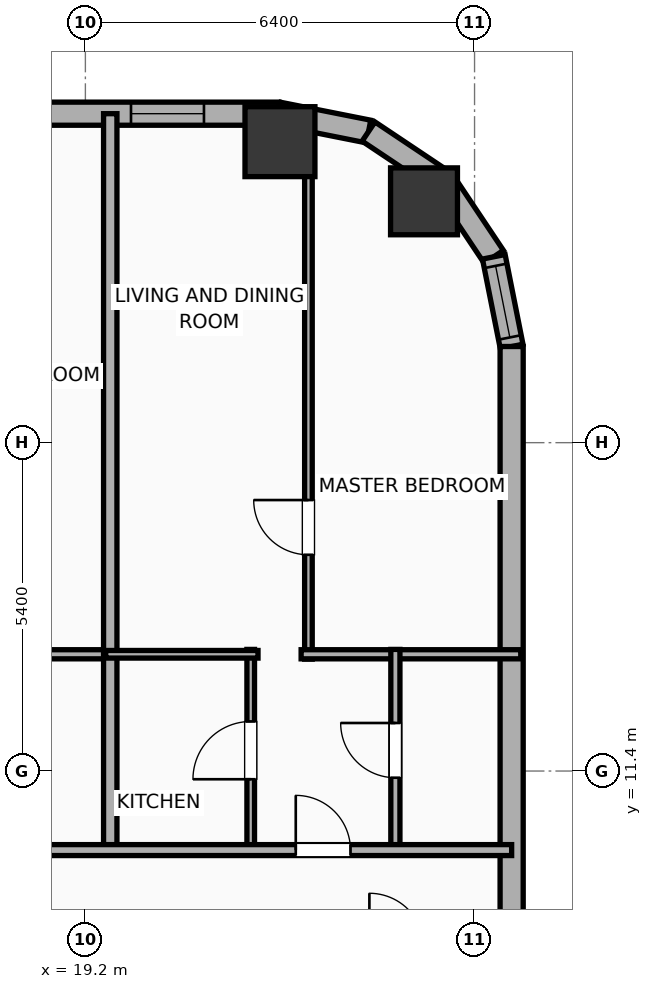
"""IFC4 building model, lengths in metres.
Left out: names, types, materials, properties, quantities, classifications, styles, units other than length and angle.
Written with IfcOpenShell. Run it as: python <this file> out.ifc"""

import sys

from ifc_helpers import new_model, si_unit, direction, frame, frame_2d, origin, origin_2d, place, context, subcontext, project, spatial, rectangle, hollow_rectangle, hollow_circle, extrude, element, fill, save


model = new_model("IFC4")
c1 = context("Model", 3, precision=1e-05, world=origin(), true_north=direction((0.0, 1.0)))
c2 = subcontext(c1, "Body", "Model", "MODEL_VIEW")
j1 = project(units=[si_unit("LENGTHUNIT", "METRE"), si_unit("PLANEANGLEUNIT", "RADIAN")], contexts=[c1])
p1 = place(None, origin())
s1 = spatial("IfcSite", under=j1, at=p1, CompositionType="ELEMENT")
p2 = place(p1, origin())
s2 = spatial("IfcBuilding", under=s1, at=p2, CompositionType="ELEMENT")
p3 = place(p2, frame((0.0, 0.0, 37.7)))
s3 = spatial("IfcBuildingStorey", under=s2, at=p3, CompositionType="ELEMENT", Elevation=37.7)
p4 = place(p3, frame((24.769, 20.769, 0.0), z_axis=(0.0, 0.0, 1.0), x_axis=(1.0, 0.0, 0.0)))
e1 = element("IfcColumn", 1, at=p4, inside=s3, PredefinedType="COLUMN", context=c2, shape_type="SweptSolid", body=[
    extrude(hollow_circle(Radius=0.55, WallThickness=0.036, at=origin_2d()), origin(), (0.0, 0.0, 1.0), 3.9),
])
p5 = place(p3, frame((22.4, 21.75, 0.0), z_axis=(0.0, 0.0, 1.0), x_axis=(1.0, 0.0, 0.0)))
e2 = element("IfcColumn", 2, at=p5, inside=s3, PredefinedType="COLUMN", context=c2, shape_type="SweptSolid", body=[
    extrude(hollow_rectangle(XDim=1.15, YDim=1.15, WallThickness=0.04, at=origin_2d()), origin(), (0.0, 0.0, 1.0), 3.9),
])
p6 = place(p3, frame((-29.581, 22.21, 0.0), z_axis=(0.0, 0.0, 1.0), x_axis=(1.0, 0.0, 0.0)))
e3 = element("IfcWall", 3, at=p6, inside=s3, PredefinedType="ELEMENTEDWALL", context=c2, shape_type="SweptSolid", body=[
    extrude(rectangle(XDim=51.963, YDim=0.38, at=frame_2d((25.981, 0.0))), origin(), (0.0, 0.0, 1.0), 3.65),
])
p7 = place(p6, frame((25.631, 0.0, 0.75)))
e4 = element("IfcOpeningElement", 4, at=p7, cuts=e3, PredefinedType="OPENING", context=c2, shape_type="SweptSolid", body=[
    extrude(rectangle(XDim=2.4, YDim=2.1, at=frame_2d((1.2, 1.05))), frame((0.0, 0.2, 0.0), z_axis=(0.0, -1.0, 0.0), x_axis=(1.0, 0.0, 0.0)), (0.0, 0.0, 1.0), 0.4),
])
p8 = place(p6, frame((42.952, 0.0, 0.75)))
e5 = element("IfcOpeningElement", 5, at=p8, cuts=e3, PredefinedType="OPENING", context=c2, shape_type="SweptSolid", body=[
    extrude(rectangle(XDim=2.4, YDim=2.1, at=frame_2d((1.2, 1.05))), frame((0.0, 0.2, 0.0), z_axis=(0.0, -1.0, 0.0), x_axis=(1.0, 0.0, 0.0)), (0.0, 0.0, 1.0), 0.4),
])
p9 = place(p6, frame((1.731, 0.0, 0.75)))
e6 = element("IfcOpeningElement", 6, at=p9, cuts=e3, PredefinedType="OPENING", context=c2, shape_type="SweptSolid", body=[
    extrude(rectangle(XDim=1.2, YDim=2.05, at=frame_2d((0.6, 1.025))), frame((0.0, 0.2, 0.0), z_axis=(0.0, -1.0, 0.0), x_axis=(1.0, 0.0, 0.0)), (0.0, 0.0, 1.0), 0.4),
])
p10 = place(p6, frame((5.272, 0.0, 0.75)))
e7 = element("IfcOpeningElement", 7, at=p10, cuts=e3, PredefinedType="OPENING", context=c2, shape_type="SweptSolid", body=[
    extrude(rectangle(XDim=1.2, YDim=2.05, at=frame_2d((0.6, 1.025))), frame((0.0, 0.2, 0.0), z_axis=(0.0, -1.0, 0.0), x_axis=(1.0, 0.0, 0.0)), (0.0, 0.0, 1.0), 0.4),
])
p11 = place(p6, frame((8.356, 0.0, 0.75)))
e8 = element("IfcOpeningElement", 8, at=p11, cuts=e3, PredefinedType="OPENING", context=c2, shape_type="SweptSolid", body=[
    extrude(rectangle(XDim=1.2, YDim=2.05, at=frame_2d((0.6, 1.025))), frame((0.0, 0.2, 0.0), z_axis=(0.0, -1.0, 0.0), x_axis=(1.0, 0.0, 0.0)), (0.0, 0.0, 1.0), 0.4),
])
p12 = place(p6, frame((15.632, 0.0, 0.75)))
e9 = element("IfcOpeningElement", 9, at=p12, cuts=e3, PredefinedType="OPENING", context=c2, shape_type="SweptSolid", body=[
    extrude(rectangle(XDim=1.2, YDim=2.05, at=frame_2d((0.6, 1.025))), frame((0.0, 0.2, 0.0), z_axis=(0.0, -1.0, 0.0), x_axis=(1.0, 0.0, 0.0)), (0.0, 0.0, 1.0), 0.4),
])
p13 = place(p6, frame((12.137, 0.0, 0.75)))
e10 = element("IfcOpeningElement", 10, at=p13, cuts=e3, PredefinedType="OPENING", context=c2, shape_type="SweptSolid", body=[
    extrude(rectangle(XDim=1.2, YDim=2.05, at=frame_2d((0.6, 1.025))), frame((0.0, 0.2, 0.0), z_axis=(0.0, -1.0, 0.0), x_axis=(1.0, 0.0, 0.0)), (0.0, 0.0, 1.0), 0.4),
])
p14 = place(p6, frame((18.756, 0.0, 0.75)))
e11 = element("IfcOpeningElement", 11, at=p14, cuts=e3, PredefinedType="OPENING", context=c2, shape_type="SweptSolid", body=[
    extrude(rectangle(XDim=1.2, YDim=2.05, at=frame_2d((0.6, 1.025))), frame((0.0, 0.2, 0.0), z_axis=(0.0, -1.0, 0.0), x_axis=(1.0, 0.0, 0.0)), (0.0, 0.0, 1.0), 0.4),
])
p15 = place(p6, frame((22.907, 0.0, 0.75)))
e12 = element("IfcOpeningElement", 12, at=p15, cuts=e3, PredefinedType="OPENING", context=c2, shape_type="SweptSolid", body=[
    extrude(rectangle(XDim=1.2, YDim=2.05, at=frame_2d((0.6, 1.025))), frame((0.0, 0.2, 0.0), z_axis=(0.0, -1.0, 0.0), x_axis=(1.0, 0.0, 0.0)), (0.0, 0.0, 1.0), 0.4),
])
p16 = place(p6, frame((36.381, 0.0, 0.75)))
e13 = element("IfcOpeningElement", 13, at=p16, cuts=e3, PredefinedType="OPENING", context=c2, shape_type="SweptSolid", body=[
    extrude(rectangle(XDim=1.2, YDim=2.05, at=frame_2d((0.6, 1.025))), frame((0.0, 0.2, 0.0), z_axis=(0.0, -1.0, 0.0), x_axis=(1.0, 0.0, 0.0)), (0.0, 0.0, 1.0), 0.4),
])
p17 = place(p6, frame((32.886, 0.0, 0.75)))
e14 = element("IfcOpeningElement", 14, at=p17, cuts=e3, PredefinedType="OPENING", context=c2, shape_type="SweptSolid", body=[
    extrude(rectangle(XDim=1.2, YDim=2.05, at=frame_2d((0.6, 1.025))), frame((0.0, 0.2, 0.0), z_axis=(0.0, -1.0, 0.0), x_axis=(1.0, 0.0, 0.0)), (0.0, 0.0, 1.0), 0.4),
])
p18 = place(p6, frame((39.556, 0.0, 0.75)))
e15 = element("IfcOpeningElement", 15, at=p18, cuts=e3, PredefinedType="OPENING", context=c2, shape_type="SweptSolid", body=[
    extrude(rectangle(XDim=1.2, YDim=2.05, at=frame_2d((0.6, 1.025))), frame((0.0, 0.2, 0.0), z_axis=(0.0, -1.0, 0.0), x_axis=(1.0, 0.0, 0.0)), (0.0, 0.0, 1.0), 0.4),
])
p19 = place(p6, frame((46.885, 0.0, 0.75)))
e16 = element("IfcOpeningElement", 16, at=p19, cuts=e3, PredefinedType="OPENING", context=c2, shape_type="SweptSolid", body=[
    extrude(rectangle(XDim=1.2, YDim=2.05, at=frame_2d((0.6, 1.025))), frame((0.0, 0.2, 0.0), z_axis=(0.0, -1.0, 0.0), x_axis=(1.0, 0.0, 0.0)), (0.0, 0.0, 1.0), 0.4),
])
p20 = place(p6, frame((49.531, 0.0, 0.75)))
e17 = element("IfcOpeningElement", 17, at=p20, cuts=e3, PredefinedType="OPENING", context=c2, shape_type="SweptSolid", body=[
    extrude(rectangle(XDim=1.2, YDim=2.05, at=frame_2d((0.6, 1.025))), frame((0.0, 0.2, 0.0), z_axis=(0.0, -1.0, 0.0), x_axis=(1.0, 0.0, 0.0)), (0.0, 0.0, 1.0), 0.4),
])
p21 = place(p3, frame((22.381, 22.21, 0.0), z_axis=(0.0, 0.0, 1.0), x_axis=(0.980786132421, -0.195086038585, 0.0)))
e18 = element("IfcWall", 18, at=p21, inside=s3, PredefinedType="ELEMENTEDWALL", context=c2, shape_type="SweptSolid", body=[
    extrude(rectangle(XDim=1.504, YDim=0.38, at=frame_2d((0.752, 0.0))), origin(), (0.0, 0.0, 1.0), 3.65),
])
for number, where, z_axis, x_axis in (
    (19, (23.857, 21.917, 0.0), (0.0, 0.0, 1.0), (0.831, -0.556, 0.0)),
    (20, (25.091, 21.091, 0.0), (0.0, 0.0, 1.0), (0.556, -0.831, 0.0)),
):
    element("IfcWall", number, at=place(p3, frame(where, z_axis=z_axis, x_axis=x_axis)), inside=s3, PredefinedType="ELEMENTEDWALL", context=c2, shape_type="SweptSolid", body=[
        extrude(rectangle(XDim=1.485, YDim=0.38, at=frame_2d((0.743, 0.0))), origin(), (0.0, 0.0, 1.0), 3.65),
    ])
p22 = place(p3, frame((25.917, 19.857, 0.0), z_axis=(0.0, 0.0, 1.0), x_axis=(0.195086038585, -0.980786132421, 0.0)))
e21 = element("IfcWall", 21, at=p22, inside=s3, PredefinedType="ELEMENTEDWALL", context=c2, shape_type="SweptSolid", body=[
    extrude(rectangle(XDim=1.504, YDim=0.38, at=frame_2d((0.752, 0.0))), origin(), (0.0, 0.0, 1.0), 3.65),
])
p23 = place(p22, frame((0.152, 0.0, 0.75)))
e22 = element("IfcOpeningElement", 22, at=p23, cuts=e21, PredefinedType="OPENING", context=c2, shape_type="SweptSolid", body=[
    extrude(rectangle(XDim=1.2, YDim=2.05, at=frame_2d((0.6, 1.025))), frame((0.0, 0.2, 0.0), z_axis=(0.0, -1.0, 0.0), x_axis=(1.0, 0.0, 0.0)), (0.0, 0.0, 1.0), 0.4),
])
p24 = place(p3, frame((26.21, 18.381, 0.0), z_axis=(0.0, 0.0, 1.0), x_axis=(0.0, -1.0, 0.0)))
e23 = element("IfcWall", 23, at=p24, inside=s3, PredefinedType="ELEMENTEDWALL", context=c2, shape_type="SweptSolid", body=[
    extrude(rectangle(XDim=36.763, YDim=0.38, at=frame_2d((18.381, 0.0))), origin(), (0.0, 0.0, 1.0), 3.65),
])
p25 = place(p3, frame((16.079, 13.32, 0.0), z_axis=(0.0, 0.0, 1.0), x_axis=(1.0, 0.0, 0.0)))
e24 = element("IfcWall", 24, at=p25, inside=s3, PredefinedType="PLUMBINGWALL", context=c2, shape_type="SweptSolid", body=[
    extrude(rectangle(XDim=3.605, YDim=0.15, at=frame_2d((1.802, 0.0))), origin(), (0.0, 0.0, 1.0), 3.65),
])
p26 = place(p3, frame((19.609, 10.02, 0.0), z_axis=(0.0, 0.0, 1.0), x_axis=(0.0, 1.0, 0.0)))
e25 = element("IfcWall", 25, at=p26, inside=s3, PredefinedType="PARTITIONING", context=c2, shape_type="SweptSolid", body=[
    extrude(rectangle(XDim=12.19, YDim=0.22, at=frame_2d((6.095, 0.0))), origin(), (0.0, 0.0, 1.0), 3.65),
])
p27 = place(p3, frame((22.868, 13.24, 0.0), z_axis=(0.0, 0.0, 1.0), x_axis=(0.0, 1.0, 0.0)))
e26 = element("IfcWall", 26, at=p27, inside=s3, PredefinedType="PARTITIONING", context=c2, shape_type="SweptSolid", body=[
    extrude(rectangle(XDim=9.026, YDim=0.125, at=frame_2d((4.513, 0.0))), origin(), (0.0, 0.0, 1.0), 2.94),
])
p28 = place(p27, frame((1.716, 0.0, 0.0)))
e27 = element("IfcOpeningElement", 27, at=p28, cuts=e26, PredefinedType="OPENING", context=c2, shape_type="SweptSolid", body=[
    extrude(rectangle(XDim=0.9, YDim=2.05, at=frame_2d((0.45, 1.025))), frame((0.0, 0.073, 0.0), z_axis=(0.0, -1.0, 0.0), x_axis=(1.0, 0.0, 0.0)), (0.0, 0.0, 1.0), 0.145),
])
p29 = place(p3, frame((22.748, 13.32, 0.0), z_axis=(0.0, 0.0, 1.0), x_axis=(1.0, 0.0, 0.0)))
e28 = element("IfcWall", 28, at=p29, inside=s3, PredefinedType="PLUMBINGWALL", context=c2, shape_type="SweptSolid", body=[
    extrude(rectangle(XDim=3.612, YDim=0.15, at=frame_2d((1.806, 0.0))), origin(), (0.0, 0.0, 1.0), 3.65),
])
p30 = place(p3, frame((21.919, 10.08, 0.0), z_axis=(0.0, 0.0, 1.0), x_axis=(0.0, 1.0, 0.0)))
e29 = element("IfcWall", 29, at=p30, inside=s3, PredefinedType="PARTITIONING", context=c2, shape_type="SweptSolid", body=[
    extrude(rectangle(XDim=3.32, YDim=0.125, at=frame_2d((1.66, 0.0))), origin(), (0.0, 0.0, 1.0), 3.65),
])
p31 = place(p30, frame((1.185, 0.0, 0.0)))
e30 = element("IfcOpeningElement", 30, at=p31, cuts=e29, PredefinedType="OPENING", context=c2, shape_type="SweptSolid", body=[
    extrude(rectangle(XDim=0.95, YDim=2.05, at=frame_2d((0.475, 1.025))), frame((0.0, 0.073, 0.0), z_axis=(0.0, -1.0, 0.0), x_axis=(1.0, 0.0, 0.0)), (0.0, 0.0, 1.0), 0.145),
])
p32 = place(p3, frame((19.534, 13.32, 0.0), z_axis=(0.0, 0.0, 1.0), x_axis=(1.0, 0.0, 0.0)))
e31 = element("IfcWall", 31, at=p32, inside=s3, PredefinedType="PARTITIONING", context=c2, shape_type="SweptSolid", body=[
    extrude(rectangle(XDim=2.505, YDim=0.125, at=frame_2d((1.252, 0.0))), origin(), (0.0, 0.0, 1.0), 3.65),
])
p33 = place(p3, frame((24.298, 10.08, 0.0), z_axis=(0.0, 0.0, 1.0), x_axis=(0.0, 1.0, 0.0)))
e32 = element("IfcWall", 32, at=p33, inside=s3, PredefinedType="PLUMBINGWALL", context=c2, shape_type="SweptSolid", body=[
    extrude(rectangle(XDim=3.32, YDim=0.15, at=frame_2d((1.66, 0.0))), origin(), (0.0, 0.0, 1.0), 3.65),
])
p34 = place(p33, frame((1.21, 0.0, 0.0)))
e33 = element("IfcOpeningElement", 33, at=p34, cuts=e32, PredefinedType="OPENING", context=c2, shape_type="SweptSolid", body=[
    extrude(rectangle(XDim=0.9, YDim=2.05, at=frame_2d((0.45, 1.025))), frame((0.0, 0.085, 0.0), z_axis=(0.0, -1.0, 0.0), x_axis=(1.0, 0.0, 0.0)), (0.0, 0.0, 1.0), 0.17),
])
p35 = place(p3, frame((-33.41, 10.1, 0.0), z_axis=(0.0, 0.0, 1.0), x_axis=(1.0, 0.0, 0.0)))
e34 = element("IfcWall", 34, at=p35, inside=s3, PredefinedType="PARTITIONING", context=c2, shape_type="SweptSolid", body=[
    extrude(rectangle(XDim=59.62, YDim=0.18, at=frame_2d((29.81, 0.0))), origin(), (0.0, 0.0, 1.0), 3.65),
])
p36 = place(p35, frame((3.354, 0.0, 0.0)))
e35 = element("IfcOpeningElement", 35, at=p36, cuts=e34, PredefinedType="OPENING", context=c2, shape_type="SweptSolid", body=[
    extrude(rectangle(XDim=1.15, YDim=2.05, at=frame_2d((0.575, 1.025))), frame((0.0, 0.1, 0.0), z_axis=(0.0, -1.0, 0.0), x_axis=(1.0, 0.0, 0.0)), (0.0, 0.0, 1.0), 0.2),
])
p37 = place(p35, frame((10.997, 0.0, 0.0)))
e36 = element("IfcOpeningElement", 36, at=p37, cuts=e34, PredefinedType="OPENING", context=c2, shape_type="SweptSolid", body=[
    extrude(rectangle(XDim=1.15, YDim=2.05, at=frame_2d((0.575, 1.025))), frame((0.0, 0.1, 0.0), z_axis=(0.0, -1.0, 0.0), x_axis=(1.0, 0.0, 0.0)), (0.0, 0.0, 1.0), 0.2),
])
p38 = place(p35, frame((20.232, 0.0, 0.0)))
e37 = element("IfcOpeningElement", 37, at=p38, cuts=e34, PredefinedType="OPENING", context=c2, shape_type="SweptSolid", body=[
    extrude(rectangle(XDim=1.15, YDim=2.05, at=frame_2d((0.575, 1.025))), frame((0.0, 0.1, 0.0), z_axis=(0.0, -1.0, 0.0), x_axis=(1.0, 0.0, 0.0)), (0.0, 0.0, 1.0), 0.2),
])
p39 = place(p35, frame((30.38, 0.0, 0.0)))
e38 = element("IfcOpeningElement", 38, at=p39, cuts=e34, PredefinedType="OPENING", context=c2, shape_type="SweptSolid", body=[
    extrude(rectangle(XDim=1.15, YDim=2.05, at=frame_2d((0.575, 1.025))), frame((0.0, 0.1, 0.0), z_axis=(0.0, -1.0, 0.0), x_axis=(1.0, 0.0, 0.0)), (0.0, 0.0, 1.0), 0.2),
])
p40 = place(p35, frame((40.998, 0.0, 0.0)))
e39 = element("IfcOpeningElement", 39, at=p40, cuts=e34, PredefinedType="OPENING", context=c2, shape_type="SweptSolid", body=[
    extrude(rectangle(XDim=1.15, YDim=2.05, at=frame_2d((0.575, 1.025))), frame((0.0, 0.1, 0.0), z_axis=(0.0, -1.0, 0.0), x_axis=(1.0, 0.0, 0.0)), (0.0, 0.0, 1.0), 0.2),
])
p41 = place(p35, frame((49.428, 0.0, 0.0)))
e40 = element("IfcOpeningElement", 40, at=p41, cuts=e34, PredefinedType="OPENING", context=c2, shape_type="SweptSolid", body=[
    extrude(rectangle(XDim=0.9, YDim=2.05, at=frame_2d((0.45, 1.025))), frame((0.0, 0.1, 0.0), z_axis=(0.0, -1.0, 0.0), x_axis=(1.0, 0.0, 0.0)), (0.0, 0.0, 1.0), 0.2),
])
p42 = place(p35, frame((56.07, 0.0, 0.0)))
e41 = element("IfcOpeningElement", 41, at=p42, cuts=e34, PredefinedType="OPENING", context=c2, shape_type="SweptSolid", body=[
    extrude(rectangle(XDim=0.9, YDim=2.05, at=frame_2d((0.45, 1.025))), frame((0.0, 0.1, 0.0), z_axis=(0.0, -1.0, 0.0), x_axis=(1.0, 0.0, 0.0)), (0.0, 0.0, 1.0), 0.2),
])
p43 = place(p20, origin())
e42 = element("IfcWindow", 42, at=p43, inside=s3, PartitioningType="SINGLE_PANEL", PredefinedType="WINDOW", context=c2, shape_type="SweptSolid", body=[
    extrude(rectangle(XDim=1.2, YDim=2.05, at=frame_2d((0.6, 1.025))), frame((0.0, 0.03, 0.0), z_axis=(0.0, -1.0, 0.0), x_axis=(1.0, 0.0, 0.0)), (0.0, 0.0, 1.0), 0.06),
])
fill(e17, e42)
p44 = place(p23, origin())
e43 = element("IfcWindow", 43, at=p44, inside=s3, PartitioningType="SINGLE_PANEL", PredefinedType="WINDOW", context=c2, shape_type="SweptSolid", body=[
    extrude(rectangle(XDim=1.2, YDim=2.05, at=frame_2d((0.6, 1.025))), frame((0.0, 0.03, 0.0), z_axis=(0.0, -1.0, 0.0), x_axis=(1.0, 0.0, 0.0)), (0.0, 0.0, 1.0), 0.06),
])
fill(e22, e43)
p45 = place(p28, origin())
e44 = element("IfcDoor", 44, at=p45, inside=s3, OperationType="SINGLE_SWING_RIGHT", PredefinedType="DOOR", context=c2, shape_type="SweptSolid", body=[
    extrude(rectangle(XDim=0.9, YDim=2.05, at=frame_2d((0.45, 1.025))), frame((0.0, 0.025, 0.0), z_axis=(0.0, -1.0, 0.0), x_axis=(1.0, 0.0, 0.0)), (0.0, 0.0, 1.0), 0.05),
])
fill(e27, e44)
p46 = place(p31, origin())
e45 = element("IfcDoor", 45, at=p46, inside=s3, OperationType="SINGLE_SWING_LEFT", PredefinedType="DOOR", context=c2, shape_type="SweptSolid", body=[
    extrude(rectangle(XDim=0.95, YDim=2.05, at=frame_2d((0.475, 1.025))), frame((0.0, 0.025, 0.0), z_axis=(0.0, -1.0, 0.0), x_axis=(1.0, 0.0, 0.0)), (0.0, 0.0, 1.0), 0.05),
])
fill(e30, e45)
p47 = place(p34, origin())
e46 = element("IfcDoor", 46, at=p47, inside=s3, OperationType="SINGLE_SWING_RIGHT", PredefinedType="DOOR", context=c2, shape_type="SweptSolid", body=[
    extrude(rectangle(XDim=0.9, YDim=2.05, at=frame_2d((0.45, 1.025))), frame((0.0, 0.025, 0.0), z_axis=(0.0, -1.0, 0.0), x_axis=(1.0, 0.0, 0.0)), (0.0, 0.0, 1.0), 0.05),
])
fill(e33, e46)
p48 = place(p42, origin())
e47 = element("IfcDoor", 47, at=p48, inside=s3, OperationType="SINGLE_SWING_LEFT", PredefinedType="DOOR", context=c2, shape_type="SweptSolid", body=[
    extrude(rectangle(XDim=0.9, YDim=2.05, at=frame_2d((0.45, 1.025))), frame((0.0, 0.025, 0.0), z_axis=(0.0, -1.0, 0.0), x_axis=(1.0, 0.0, 0.0)), (0.0, 0.0, 1.0), 0.05),
])
fill(e41, e47)
save(model, sys.argv[1])
